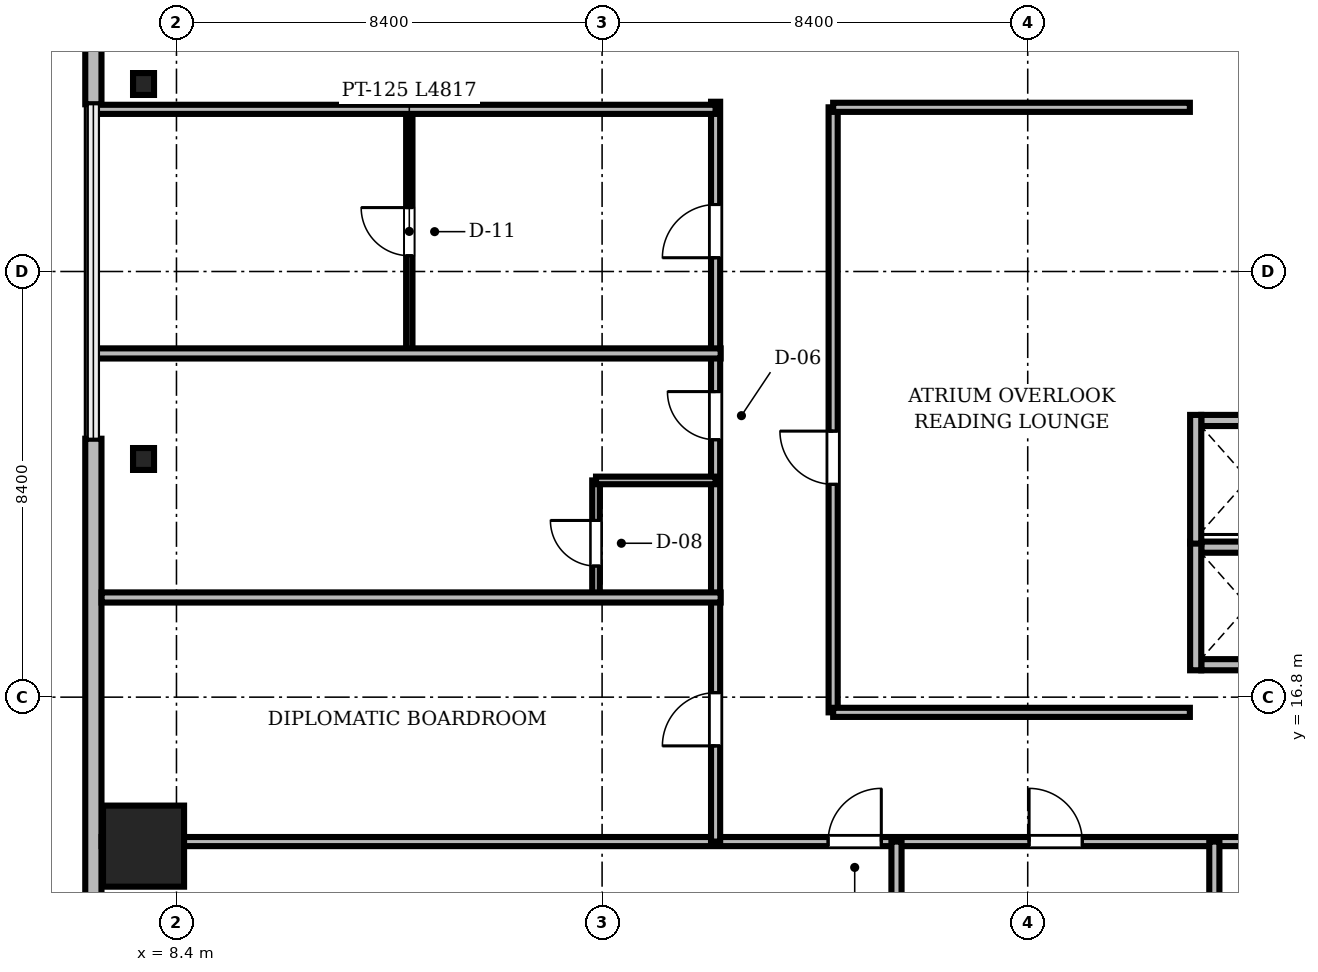
"""IFC4 building model, lengths in metres.
Left out: names, types, materials, properties, quantities, classifications, styles, units other than length and angle.
Written with IfcOpenShell. Run it as: python <this file> out.ifc"""

import sys

from ifc_helpers import new_model, si_unit, direction, frame, frame_2d, origin, origin_2d, place, context, subcontext, project, spatial, rectangle, i_section, extrude, source, transform, mapped, element, fill, save


model = new_model("IFC4")
c1 = context("Model", 3, precision=1e-05, world=origin(), true_north=direction((0.0, 1.0)))
c2 = subcontext(c1, "Body", "Model", "MODEL_VIEW")
j1 = project(units=[si_unit("LENGTHUNIT", "METRE"), si_unit("PLANEANGLEUNIT", "RADIAN")], contexts=[c1])
p1 = place(None, origin())
s1 = spatial("IfcSite", under=j1, at=p1, CompositionType="ELEMENT")
p2 = place(p1, origin())
s2 = spatial("IfcBuilding", under=s1, at=p2, CompositionType="ELEMENT")
p3 = place(p2, frame((0.0, 0.0, 118.7)))
s3 = spatial("IfcBuildingStorey", under=s2, at=p3, CompositionType="ELEMENT", Elevation=118.7)
m1 = source(origin(), c2, "Body", "SweptSolid", [
    extrude(rectangle(XDim=1.6, YDim=1.6, at=origin_2d()), origin(), (0.0, 0.0, 1.0), 3.46),
])
p4 = place(p3, frame((7.75, 13.86, 0.0), z_axis=(0.0, 0.0, 1.0), x_axis=(1.0, 0.0, 0.0)))
e1 = element("IfcColumn", 1, at=p4, inside=s3, PredefinedType="COLUMN", context=c2, shape_type="MappedRepresentation", body=[
    mapped(m1, transform((0.0, 0.0, 0.0), scale=1.0)),
])
m2 = source(origin(), c2, "Body", "SweptSolid", [
    extrude(i_section(OverallWidth=0.414, OverallDepth=0.432, WebThickness=0.026, FlangeThickness=0.04, FilletRadius=0.015, at=origin_2d()), origin(), (0.0, 0.0, 1.0), 3.46),
])
for number, where, z_axis, x_axis in (
    (2, (7.75, 28.9, 0.0), (0.0, 0.0, 1.0), (1.0, 0.0, 0.0)),
    (3, (7.75, 21.5, 0.0), (0.0, 0.0, 1.0), (1.0, 0.0, 0.0)),
):
    element("IfcColumn", number, at=place(p3, frame(where, z_axis=z_axis, x_axis=x_axis)), inside=s3, PredefinedType="COLUMN", context=c2, shape_type="MappedRepresentation", body=[
        mapped(m2, transform((0.0, 0.0, 0.0), scale=1.0)),
    ])
m3 = source(origin(), c2, "Body", "SweptSolid", [
    extrude(rectangle(XDim=15.6, YDim=0.32, at=frame_2d((7.8, 0.0))), origin(), (0.0, 0.0, 1.0), 3.46),
])
p5 = place(p3, frame((6.76, 44.1, 0.0), z_axis=(0.0, 0.0, 1.0), x_axis=(0.0, -1.0, 0.0)))
e4 = element("IfcWall", 4, at=p5, inside=s3, PredefinedType="SOLIDWALL", context=c2, shape_type="MappedRepresentation", body=[
    mapped(m3, transform((0.0, 0.0, 0.0), scale=1.0)),
])
m4 = source(origin(), c2, "Body", "SweptSolid", [
    extrude(rectangle(XDim=1.4, YDim=2.3, at=frame_2d((0.7, 1.15))), frame((0.0, 0.17, 0.0), z_axis=(0.0, -1.0, 0.0), x_axis=(1.0, 0.0, 0.0)), (0.0, 0.0, 1.0), 0.34),
])
p6 = place(p5, frame((9.61, 0.0, 0.0)))
e5 = element("IfcOpeningElement", 5, at=p6, cuts=e4, PredefinedType="OPENING", context=c2, shape_type="MappedRepresentation", body=[
    mapped(m4, transform((0.0, 0.0, 0.0), scale=1.0)),
])
m5 = source(origin(), c2, "Body", "SweptSolid", [
    extrude(rectangle(XDim=2.8, YDim=2.4, at=frame_2d((1.4, 1.2))), frame((0.0, 0.17, 0.0), z_axis=(0.0, -1.0, 0.0), x_axis=(1.0, 0.0, 0.0)), (0.0, 0.0, 1.0), 0.34),
])
p7 = place(p5, frame((2.705, 0.0, 0.72)))
e6 = element("IfcOpeningElement", 6, at=p7, cuts=e4, PredefinedType="OPENING", context=c2, shape_type="MappedRepresentation", body=[
    mapped(m5, transform((0.0, 0.0, 0.0), scale=1.0)),
])
m6 = source(origin(), c2, "Body", "SweptSolid", [
    extrude(rectangle(XDim=15.6, YDim=0.32, at=frame_2d((7.8, 0.0))), origin(), (0.0, 0.0, 1.0), 3.46),
])
p8 = place(p3, frame((6.76, 21.9, 0.0), z_axis=(0.0, 0.0, 1.0), x_axis=(0.0, -1.0, 0.0)))
e7 = element("IfcWall", 7, at=p8, inside=s3, PredefinedType="SOLIDWALL", context=c2, shape_type="MappedRepresentation", body=[
    mapped(m6, transform((0.0, 0.0, 0.0), scale=1.0)),
])
p9 = place(p8, frame((10.095, 0.0, 0.72)))
e8 = element("IfcOpeningElement", 8, at=p9, cuts=e7, PredefinedType="OPENING", context=c2, shape_type="MappedRepresentation", body=[
    mapped(m5, transform((0.0, 0.0, 0.0), scale=1.0)),
])
m7 = source(origin(), c2, "Body", "SweptSolid", [
    extrude(rectangle(XDim=1.85, YDim=0.22, at=frame_2d((0.925, 0.0))), origin(), (0.0, 0.0, 1.0), 3.46),
])
for number, where, z_axis, x_axis in (
    (9, (28.625, 17.44, 0.0), (0.0, 0.0, 1.0), (1.0, 0.0, 0.0)),
    (10, (28.625, 19.76, 0.0), (0.0, 0.0, 1.0), (1.0, 0.0, 0.0)),
):
    element("IfcWall", number, at=place(p3, frame(where, z_axis=z_axis, x_axis=x_axis)), inside=s3, PredefinedType="SOLIDWALL", context=c2, shape_type="MappedRepresentation", body=[
        mapped(m7, transform((0.0, 0.0, 0.0), scale=1.0)),
    ])
m8 = source(origin(), c2, "Body", "SweptSolid", [
    extrude(rectangle(XDim=2.54, YDim=0.22, at=frame_2d((1.27, 0.0))), origin(), (0.0, 0.0, 1.0), 3.46),
])
p10 = place(p3, frame((28.515, 17.33, 0.0), z_axis=(0.0, 0.0, 1.0), x_axis=(0.0, 1.0, 0.0)))
e11 = element("IfcWall", 11, at=p10, inside=s3, PredefinedType="SOLIDWALL", context=c2, shape_type="MappedRepresentation", body=[
    mapped(m8, transform((0.0, 0.0, 0.0), scale=1.0)),
])
p11 = place(p3, frame((28.625, 22.26, 0.0), z_axis=(0.0, 0.0, 1.0), x_axis=(1.0, 0.0, 0.0)))
e12 = element("IfcWall", 12, at=p11, inside=s3, PredefinedType="SOLIDWALL", context=c2, shape_type="MappedRepresentation", body=[
    mapped(m7, transform((0.0, 0.0, 0.0), scale=1.0)),
])
p12 = place(p3, frame((28.515, 19.83, 0.0), z_axis=(0.0, 0.0, 1.0), x_axis=(0.0, 1.0, 0.0)))
e13 = element("IfcWall", 13, at=p12, inside=s3, PredefinedType="SOLIDWALL", context=c2, shape_type="MappedRepresentation", body=[
    mapped(m8, transform((0.0, 0.0, 0.0), scale=1.0)),
])
m9 = source(origin(), c2, "Body", "SweptSolid", [
    extrude(rectangle(XDim=46.156, YDim=0.18, at=frame_2d((23.078, 0.0))), origin(), (0.0, 0.0, 1.0), 2.702),
])
p13 = place(p3, frame((6.922, 13.95, 0.0), z_axis=(0.0, 0.0, 1.0), x_axis=(1.0, 0.0, 0.0)))
e14 = element("IfcWall", 14, at=p13, inside=s3, PredefinedType="PARTITIONING", context=c2, shape_type="MappedRepresentation", body=[
    mapped(m9, transform((0.0, 0.0, 0.0), scale=1.0)),
])
m10 = source(origin(), c2, "Body", "SweptSolid", [
    extrude(rectangle(XDim=1.05, YDim=2.2, at=frame_2d((0.525, 1.1))), frame((0.0, 0.1, 0.0), z_axis=(0.0, -1.0, 0.0), x_axis=(1.0, 0.0, 0.0)), (0.0, 0.0, 1.0), 0.2),
])
p14 = place(p13, frame((14.338, 0.0, 0.0)))
e15 = element("IfcOpeningElement", 15, at=p14, cuts=e14, PredefinedType="OPENING", context=c2, shape_type="MappedRepresentation", body=[
    mapped(m10, transform((0.0, 0.0, 0.0), scale=1.0)),
])
p15 = place(p13, frame((18.305, 0.0, 0.0)))
e16 = element("IfcOpeningElement", 16, at=p15, cuts=e14, PredefinedType="OPENING", context=c2, shape_type="MappedRepresentation", body=[
    mapped(m10, transform((0.0, 0.0, 0.0), scale=1.0)),
])
p16 = place(p13, frame((25.178, 0.0, 0.0)))
e17 = element("IfcOpeningElement", 17, at=p16, cuts=e14, PredefinedType="OPENING", context=c2, shape_type="MappedRepresentation", body=[
    mapped(m10, transform((0.0, 0.0, 0.0), scale=1.0)),
])
p17 = place(p13, frame((32.651, 0.0, 0.0)))
e18 = element("IfcOpeningElement", 18, at=p17, cuts=e14, PredefinedType="OPENING", context=c2, shape_type="MappedRepresentation", body=[
    mapped(m10, transform((0.0, 0.0, 0.0), scale=1.0)),
])
p18 = place(p13, frame((40.998, 0.0, 0.0)))
e19 = element("IfcOpeningElement", 19, at=p18, cuts=e14, PredefinedType="OPENING", context=c2, shape_type="MappedRepresentation", body=[
    mapped(m10, transform((0.0, 0.0, 0.0), scale=1.0)),
])
m11 = source(origin(), c2, "Body", "SweptSolid", [
    extrude(rectangle(XDim=14.6, YDim=0.18, at=frame_2d((7.3, 0.0))), origin(), (0.0, 0.0, 1.0), 2.852),
])
p19 = place(p3, frame((19.04, 13.95, 0.0), z_axis=(0.0, 0.0, 1.0), x_axis=(0.0, 1.0, 0.0)))
e20 = element("IfcWall", 20, at=p19, inside=s3, PredefinedType="PARTITIONING", context=c2, shape_type="MappedRepresentation", body=[
    mapped(m11, transform((0.0, 0.0, 0.0), scale=1.0)),
])
p20 = place(p19, frame((1.888, 0.0, 0.0)))
e21 = element("IfcOpeningElement", 21, at=p20, cuts=e20, PredefinedType="OPENING", context=c2, shape_type="MappedRepresentation", body=[
    mapped(m10, transform((0.0, 0.0, 0.0), scale=1.0)),
])
m12 = source(origin(), c2, "Body", "SweptSolid", [
    extrude(rectangle(XDim=0.95, YDim=2.15, at=frame_2d((0.475, 1.075))), frame((0.0, 0.1, 0.0), z_axis=(0.0, -1.0, 0.0), x_axis=(1.0, 0.0, 0.0)), (0.0, 0.0, 1.0), 0.2),
])
p21 = place(p19, frame((7.93, 0.0, 0.0)))
e22 = element("IfcOpeningElement", 22, at=p21, cuts=e20, PredefinedType="OPENING", context=c2, shape_type="MappedRepresentation", body=[
    mapped(m12, transform((0.0, 0.0, 0.0), scale=1.0)),
])
p22 = place(p19, frame((11.522, 0.0, 0.0)))
e23 = element("IfcOpeningElement", 23, at=p22, cuts=e20, PredefinedType="OPENING", context=c2, shape_type="MappedRepresentation", body=[
    mapped(m10, transform((0.0, 0.0, 0.0), scale=1.0)),
])
m13 = source(origin(), c2, "Body", "SweptSolid", [
    extrude(rectangle(XDim=11.94, YDim=0.18, at=frame_2d((5.97, 0.0))), origin(), (0.0, 0.0, 1.0), 2.852),
])
p23 = place(p3, frame((21.36, 16.5, 0.0), z_axis=(0.0, 0.0, 1.0), x_axis=(0.0, 1.0, 0.0)))
e24 = element("IfcWall", 24, at=p23, inside=s3, PredefinedType="PARTITIONING", context=c2, shape_type="MappedRepresentation", body=[
    mapped(m13, transform((0.0, 0.0, 0.0), scale=1.0)),
])
p24 = place(p23, frame((4.5, 0.0, 0.0)))
e25 = element("IfcOpeningElement", 25, at=p24, cuts=e24, PredefinedType="OPENING", context=c2, shape_type="MappedRepresentation", body=[
    mapped(m10, transform((0.0, 0.0, 0.0), scale=1.0)),
])
m14 = source(origin(), c2, "Body", "SweptSolid", [
    extrude(rectangle(XDim=4.817, YDim=0.125, at=frame_2d((2.408, 0.0))), origin(), (0.0, 0.0, 1.0), 2.852),
])
p25 = place(p3, frame((12.995, 23.583, 0.0), z_axis=(0.0, 0.0, 1.0), x_axis=(0.0, 1.0, 0.0)))
e26 = element("IfcWall", 26, at=p25, inside=s3, PredefinedType="PARTITIONING", context=c2, shape_type="MappedRepresentation", body=[
    mapped(m14, transform((0.0, 0.0, 0.0), scale=1.0)),
])
m15 = source(origin(), c2, "Body", "SweptSolid", [
    extrude(rectangle(XDim=0.95, YDim=2.15, at=frame_2d((0.475, 1.075))), frame((0.0, 0.073, 0.0), z_axis=(0.0, -1.0, 0.0), x_axis=(1.0, 0.0, 0.0)), (0.0, 0.0, 1.0), 0.145),
])
p26 = place(p25, frame((1.928, 0.0, 0.0)))
e27 = element("IfcOpeningElement", 27, at=p26, cuts=e26, PredefinedType="OPENING", context=c2, shape_type="MappedRepresentation", body=[
    mapped(m15, transform((0.0, 0.0, 0.0), scale=1.0)),
])
m16 = source(origin(), c2, "Body", "SweptSolid", [
    extrude(rectangle(XDim=2.29, YDim=0.15, at=frame_2d((1.145, 0.0))), origin(), (0.0, 0.0, 1.0), 2.852),
])
p27 = place(p3, frame((16.68, 18.787, 0.0), z_axis=(0.0, 0.0, 1.0), x_axis=(0.0, 1.0, 0.0)))
e28 = element("IfcWall", 28, at=p27, inside=s3, PredefinedType="PARTITIONING", context=c2, shape_type="MappedRepresentation", body=[
    mapped(m16, transform((0.0, 0.0, 0.0), scale=1.0)),
])
m17 = source(origin(), c2, "Body", "SweptSolid", [
    extrude(rectangle(XDim=0.9, YDim=2.1, at=frame_2d((0.45, 1.05))), frame((0.0, 0.085, 0.0), z_axis=(0.0, -1.0, 0.0), x_axis=(1.0, 0.0, 0.0)), (0.0, 0.0, 1.0), 0.17),
])
p28 = place(p27, frame((0.6, 0.0, 0.0)))
e29 = element("IfcOpeningElement", 29, at=p28, cuts=e28, PredefinedType="OPENING", context=c2, shape_type="MappedRepresentation", body=[
    mapped(m17, transform((0.0, 0.0, 0.0), scale=1.0)),
])
m18 = source(origin(), c2, "Body", "SweptSolid", [
    extrude(rectangle(XDim=12.218, YDim=0.2, at=frame_2d((6.109, 0.0))), origin(), (0.0, 0.0, 1.0), 2.702),
])
p29 = place(p3, frame((6.922, 18.767, 0.0), z_axis=(0.0, 0.0, 1.0), x_axis=(1.0, 0.0, 0.0)))
e30 = element("IfcWall", 30, at=p29, inside=s3, PredefinedType="PARTITIONING", context=c2, shape_type="MappedRepresentation", body=[
    mapped(m18, transform((0.0, 0.0, 0.0), scale=1.0)),
])
m19 = source(origin(), c2, "Body", "SweptSolid", [
    extrude(rectangle(XDim=12.41, YDim=0.2, at=frame_2d((6.205, 0.0))), origin(), (0.0, 0.0, 1.0), 2.702),
])
p30 = place(p3, frame((6.73, 23.583, 0.0), z_axis=(0.0, 0.0, 1.0), x_axis=(1.0, 0.0, 0.0)))
e31 = element("IfcWall", 31, at=p30, inside=s3, PredefinedType="PARTITIONING", context=c2, shape_type="MappedRepresentation", body=[
    mapped(m19, transform((0.0, 0.0, 0.0), scale=1.0)),
])
m20 = source(origin(), c2, "Body", "SweptSolid", [
    extrude(rectangle(XDim=12.31, YDim=0.18, at=frame_2d((6.155, 0.0))), origin(), (0.0, 0.0, 1.0), 2.702),
])
p31 = place(p3, frame((6.73, 28.4, 0.0), z_axis=(0.0, 0.0, 1.0), x_axis=(1.0, 0.0, 0.0)))
e32 = element("IfcWall", 32, at=p31, inside=s3, PredefinedType="PARTITIONING", context=c2, shape_type="MappedRepresentation", body=[
    mapped(m20, transform((0.0, 0.0, 0.0), scale=1.0)),
])
m21 = source(origin(), c2, "Body", "SweptSolid", [
    extrude(rectangle(XDim=11.828, YDim=0.2, at=frame_2d((5.914, 0.0))), origin(), (0.0, 0.0, 1.0), 2.702),
])
p32 = place(p3, frame((22.61, 2.122, 0.0), z_axis=(0.0, 0.0, 1.0), x_axis=(0.0, 1.0, 0.0)))
e33 = element("IfcWall", 33, at=p32, inside=s3, PredefinedType="PARTITIONING", context=c2, shape_type="MappedRepresentation", body=[
    mapped(m21, transform((0.0, 0.0, 0.0), scale=1.0)),
])
m22 = source(origin(), c2, "Body", "SweptSolid", [
    extrude(rectangle(XDim=12.02, YDim=0.2, at=frame_2d((6.01, 0.0))), origin(), (0.0, 0.0, 1.0), 2.702),
])
p33 = place(p3, frame((28.883, 1.93, 0.0), z_axis=(0.0, 0.0, 1.0), x_axis=(0.0, 1.0, 0.0)))
e34 = element("IfcWall", 34, at=p33, inside=s3, PredefinedType="PARTITIONING", context=c2, shape_type="MappedRepresentation", body=[
    mapped(m22, transform((0.0, 0.0, 0.0), scale=1.0)),
])
m23 = source(origin(), c2, "Body", "SweptSolid", [
    extrude(rectangle(XDim=7.04, YDim=0.18, at=frame_2d((3.52, 0.0))), origin(), (0.0, 0.0, 1.0), 3.46),
])
for number, where, z_axis, x_axis in (
    (35, (21.36, 16.5, 0.0), (0.0, 0.0, 1.0), (1.0, 0.0, 0.0)),
    (36, (21.36, 28.44, 0.0), (0.0, 0.0, 1.0), (1.0, 0.0, 0.0)),
):
    element("IfcWall", number, at=place(p3, frame(where, z_axis=z_axis, x_axis=x_axis)), inside=s3, PredefinedType="PARTITIONING", context=c2, shape_type="MappedRepresentation", body=[
        mapped(m23, transform((0.0, 0.0, 0.0), scale=1.0)),
    ])
m24 = source(origin(), c2, "Body", "SweptSolid", [
    extrude(rectangle(XDim=2.36, YDim=0.15, at=frame_2d((1.18, 0.0))), origin(), (0.0, 0.0, 1.0), 3.46),
])
p34 = place(p3, frame((16.68, 21.077, 0.0), z_axis=(0.0, 0.0, 1.0), x_axis=(1.0, 0.0, 0.0)))
e37 = element("IfcWall", 37, at=p34, inside=s3, PredefinedType="PARTITIONING", context=c2, shape_type="MappedRepresentation", body=[
    mapped(m24, transform((0.0, 0.0, 0.0), scale=1.0)),
])
m25 = source(origin(), c2, "Body", "SweptSolid", [
    extrude(rectangle(XDim=1.05, YDim=2.2, at=frame_2d((0.525, 1.1))), frame((0.0, 0.025, 0.0), z_axis=(0.0, -1.0, 0.0), x_axis=(1.0, 0.0, 0.0)), (0.0, 0.0, 1.0), 0.05),
])
p35 = place(p14, origin())
e38 = element("IfcDoor", 38, at=p35, inside=s3, OperationType="SINGLE_SWING_RIGHT", PredefinedType="DOOR", context=c2, shape_type="MappedRepresentation", body=[
    mapped(m25, transform((0.0, 0.0, 0.0), scale=1.0)),
])
fill(e15, e38)
p36 = place(p15, origin())
e39 = element("IfcDoor", 39, at=p36, inside=s3, OperationType="SINGLE_SWING_LEFT", PredefinedType="DOOR", context=c2, shape_type="MappedRepresentation", body=[
    mapped(m25, transform((0.0, 0.0, 0.0), scale=1.0)),
])
fill(e16, e39)
p37 = place(p20, origin())
e40 = element("IfcDoor", 40, at=p37, inside=s3, OperationType="SINGLE_SWING_LEFT", PredefinedType="DOOR", context=c2, shape_type="MappedRepresentation", body=[
    mapped(m25, transform((0.0, 0.0, 0.0), scale=1.0)),
])
fill(e21, e40)
m26 = source(origin(), c2, "Body", "SweptSolid", [
    extrude(rectangle(XDim=0.95, YDim=2.15, at=frame_2d((0.475, 1.075))), frame((0.0, 0.025, 0.0), z_axis=(0.0, -1.0, 0.0), x_axis=(1.0, 0.0, 0.0)), (0.0, 0.0, 1.0), 0.05),
])
p38 = place(p21, origin())
e41 = element("IfcDoor", 41, at=p38, inside=s3, OperationType="SINGLE_SWING_RIGHT", PredefinedType="DOOR", context=c2, shape_type="MappedRepresentation", body=[
    mapped(m26, transform((0.0, 0.0, 0.0), scale=1.0)),
])
fill(e22, e41)
p39 = place(p22, origin())
e42 = element("IfcDoor", 42, at=p39, inside=s3, OperationType="SINGLE_SWING_LEFT", PredefinedType="DOOR", context=c2, shape_type="MappedRepresentation", body=[
    mapped(m25, transform((0.0, 0.0, 0.0), scale=1.0)),
])
fill(e23, e42)
p40 = place(p24, origin())
e43 = element("IfcDoor", 43, at=p40, inside=s3, OperationType="SINGLE_SWING_RIGHT", PredefinedType="DOOR", context=c2, shape_type="MappedRepresentation", body=[
    mapped(m25, transform((0.0, 0.0, 0.0), scale=1.0)),
])
fill(e25, e43)
p41 = place(p26, origin())
e44 = element("IfcDoor", 44, at=p41, inside=s3, OperationType="SINGLE_SWING_RIGHT", PredefinedType="DOOR", context=c2, shape_type="MappedRepresentation", body=[
    mapped(m26, transform((0.0, 0.0, 0.0), scale=1.0)),
])
fill(e27, e44)
m27 = source(origin(), c2, "Body", "SweptSolid", [
    extrude(rectangle(XDim=0.9, YDim=2.1, at=frame_2d((0.45, 1.05))), frame((0.0, 0.025, 0.0), z_axis=(0.0, -1.0, 0.0), x_axis=(1.0, 0.0, 0.0)), (0.0, 0.0, 1.0), 0.05),
])
p42 = place(p28, origin())
e45 = element("IfcDoor", 45, at=p42, inside=s3, OperationType="SINGLE_SWING_RIGHT", PredefinedType="DOOR", context=c2, shape_type="MappedRepresentation", body=[
    mapped(m27, transform((0.0, 0.0, 0.0), scale=1.0)),
])
fill(e29, e45)
save(model, sys.argv[1])
